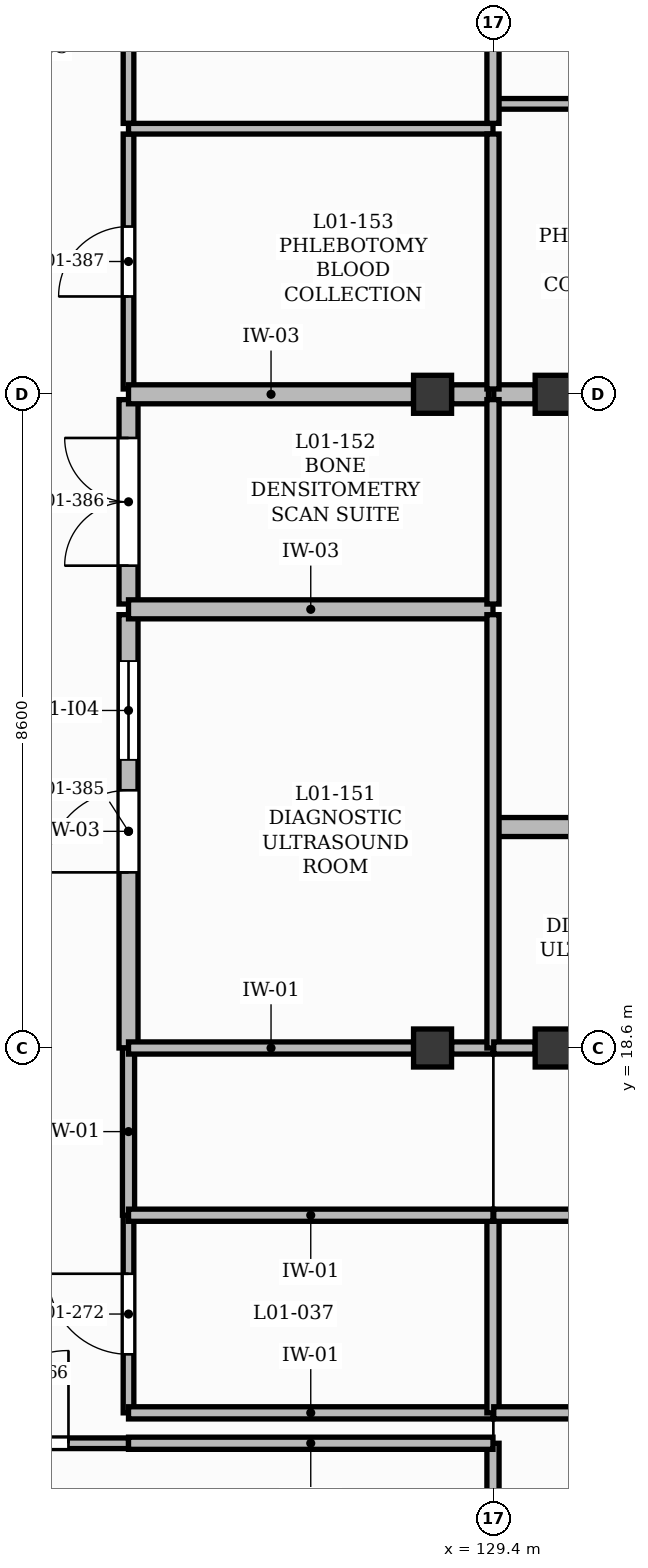
"""IFC4 building model, lengths in metres.
Left out: names, types, materials, properties, quantities, classifications, styles, units other than length and angle.
Written with IfcOpenShell. Run it as: python <this file> out.ifc"""

import sys

from ifc_helpers import new_model, si_unit, direction, frame, frame_2d, origin, origin_2d, place, context, subcontext, project, spatial, rectangle, extrude, element, fill, save


model = new_model("IFC4")
c1 = context("Model", 3, precision=1e-05, world=origin(), true_north=direction((0.0, 1.0)))
c2 = subcontext(c1, "Body", "Model", "MODEL_VIEW")
j1 = project(units=[si_unit("LENGTHUNIT", "METRE"), si_unit("PLANEANGLEUNIT", "RADIAN")], contexts=[c1])
p1 = place(None, origin())
s1 = spatial("IfcSite", under=j1, at=p1, CompositionType="ELEMENT")
p2 = place(p1, origin())
s2 = spatial("IfcBuilding", under=s1, at=p2, CompositionType="ELEMENT")
p3 = place(p2, frame((0.0, 0.0, 4.5)))
s3 = spatial("IfcBuildingStorey", under=s2, at=p3, CompositionType="ELEMENT", Elevation=4.5)
for number, where, z_axis, x_axis in (
    (1, (128.6, 18.6, 0.0), (0.0, 0.0, 1.0), (1.0, 0.0, 0.0)),
    (2, (128.6, 27.2, 0.0), (0.0, 0.0, 1.0), (1.0, 0.0, 0.0)),
    (3, (130.2, 18.6, 0.0), (0.0, 0.0, 1.0), (1.0, 0.0, 0.0)),
    (4, (130.2, 27.2, 0.0), (0.0, 0.0, 1.0), (1.0, 0.0, 0.0)),
):
    element("IfcColumn", number, at=place(p3, frame(where, z_axis=z_axis, x_axis=x_axis)), inside=s3, PredefinedType="COLUMN", context=c2, shape_type="SweptSolid", body=[
        extrude(rectangle(XDim=0.5, YDim=0.5, at=origin_2d()), origin(), (0.0, 0.0, 1.0), 4.22),
    ])
p4 = place(p3, frame((121.8, 13.4, 0.0), z_axis=(0.0, 0.0, 1.0), x_axis=(1.0, 0.0, 0.0)))
e5 = element("IfcWall", 5, at=p4, inside=s3, PredefinedType="PARTITIONING", context=c2, shape_type="SweptSolid", body=[
    extrude(rectangle(XDim=2.8, YDim=0.14, at=frame_2d((1.4, 0.0))), origin(), (0.0, 0.0, 1.0), 4.18),
])
p5 = place(p4, frame((0.79, 0.0, 0.0)))
e6 = element("IfcOpeningElement", 6, at=p5, cuts=e5, PredefinedType="OPENING", context=c2, shape_type="SweptSolid", body=[
    extrude(rectangle(XDim=1.22, YDim=2.1, at=frame_2d((0.61, 1.05))), frame((0.0, 0.08, 0.0), z_axis=(0.0, -1.0, 0.0), x_axis=(1.0, 0.0, 0.0)), (0.0, 0.0, 1.0), 0.16),
])
p6 = place(p3, frame((124.6, 13.8, 0.0), z_axis=(0.0, 0.0, 1.0), x_axis=(0.0, 1.0, 0.0)))
e7 = element("IfcWall", 7, at=p6, inside=s3, PredefinedType="PARTITIONING", context=c2, shape_type="SweptSolid", body=[
    extrude(rectangle(XDim=2.6, YDim=0.14, at=frame_2d((1.3, 0.0))), origin(), (0.0, 0.0, 1.0), 4.18),
])
p7 = place(p6, frame((0.77, 0.0, 0.0)))
e8 = element("IfcOpeningElement", 8, at=p7, cuts=e7, PredefinedType="OPENING", context=c2, shape_type="SweptSolid", body=[
    extrude(rectangle(XDim=1.06, YDim=2.15, at=frame_2d((0.53, 1.075))), frame((0.0, 0.08, 0.0), z_axis=(0.0, -1.0, 0.0), x_axis=(1.0, 0.0, 0.0)), (0.0, 0.0, 1.0), 0.16),
])
p8 = place(p3, frame((124.6, 18.6, 0.0), z_axis=(0.0, 0.0, 1.0), x_axis=(0.0, 1.0, 0.0)))
e9 = element("IfcWall", 9, at=p8, inside=s3, PredefinedType="SOLIDWALL", context=c2, shape_type="SweptSolid", body=[
    extrude(rectangle(XDim=5.701, YDim=0.25, at=frame_2d((2.851, 0.0))), origin(), (0.0, 0.0, 1.0), 4.18),
])
p9 = place(p8, frame((2.311, 0.0, 0.0)))
e10 = element("IfcOpeningElement", 10, at=p9, cuts=e9, PredefinedType="OPENING", context=c2, shape_type="SweptSolid", body=[
    extrude(rectangle(XDim=1.08, YDim=2.15, at=frame_2d((0.54, 1.075))), frame((0.0, 0.135, 0.0), z_axis=(0.0, -1.0, 0.0), x_axis=(1.0, 0.0, 0.0)), (0.0, 0.0, 1.0), 0.27),
])
p10 = place(p8, frame((3.791, 0.0, 1.1)))
e11 = element("IfcOpeningElement", 11, at=p10, cuts=e9, PredefinedType="OPENING", context=c2, shape_type="SweptSolid", body=[
    extrude(rectangle(XDim=1.3, YDim=1.0, at=frame_2d((0.65, 0.5))), frame((0.0, 0.135, 0.0), z_axis=(0.0, -1.0, 0.0), x_axis=(1.0, 0.0, 0.0)), (0.0, 0.0, 1.0), 0.27),
])
p11 = place(p3, frame((124.6, 24.441, 0.0), z_axis=(0.0, 0.0, 1.0), x_axis=(0.0, 1.0, 0.0)))
e12 = element("IfcWall", 12, at=p11, inside=s3, PredefinedType="SOLIDWALL", context=c2, shape_type="SweptSolid", body=[
    extrude(rectangle(XDim=2.689, YDim=0.25, at=frame_2d((1.344, 0.0))), origin(), (0.0, 0.0, 1.0), 4.18),
])
p12 = place(p11, frame((0.504, 0.0, 0.0)))
e13 = element("IfcOpeningElement", 13, at=p12, cuts=e12, PredefinedType="OPENING", context=c2, shape_type="SweptSolid", body=[
    extrude(rectangle(XDim=1.68, YDim=2.3, at=frame_2d((0.84, 1.15))), frame((0.0, 0.135, 0.0), z_axis=(0.0, -1.0, 0.0), x_axis=(1.0, 0.0, 0.0)), (0.0, 0.0, 1.0), 0.27),
])
p13 = place(p3, frame((124.6, 24.371, 0.0), z_axis=(0.0, 0.0, 1.0), x_axis=(1.0, 0.0, 0.0)))
e14 = element("IfcWall", 14, at=p13, inside=s3, PredefinedType="SOLIDWALL", context=c2, shape_type="SweptSolid", body=[
    extrude(rectangle(XDim=4.795, YDim=0.25, at=frame_2d((2.397, 0.0))), origin(), (0.0, 0.0, 1.0), 4.18),
])
p14 = place(p3, frame((124.6, 27.27, 0.0), z_axis=(0.0, 0.0, 1.0), x_axis=(0.0, 1.0, 0.0)))
e15 = element("IfcWall", 15, at=p14, inside=s3, PredefinedType="PARTITIONING", context=c2, shape_type="SweptSolid", body=[
    extrude(rectangle(XDim=3.354, YDim=0.14, at=frame_2d((1.677, 0.0))), origin(), (0.0, 0.0, 1.0), 4.18),
])
p15 = place(p14, frame((1.217, 0.0, 0.0)))
e16 = element("IfcOpeningElement", 16, at=p15, cuts=e15, PredefinedType="OPENING", context=c2, shape_type="SweptSolid", body=[
    extrude(rectangle(XDim=0.92, YDim=2.1, at=frame_2d((0.46, 1.05))), frame((0.0, 0.08, 0.0), z_axis=(0.0, -1.0, 0.0), x_axis=(1.0, 0.0, 0.0)), (0.0, 0.0, 1.0), 0.16),
])
p16 = place(p3, frame((124.6, 27.2, 0.0), z_axis=(0.0, 0.0, 1.0), x_axis=(1.0, 0.0, 0.0)))
e17 = element("IfcWall", 17, at=p16, inside=s3, PredefinedType="SOLIDWALL", context=c2, shape_type="SweptSolid", body=[
    extrude(rectangle(XDim=3.75, YDim=0.25, at=frame_2d((1.875, 0.0))), origin(), (0.0, 0.0, 1.0), 3.52),
])
p17 = place(p3, frame((128.85, 27.2, 0.0), z_axis=(0.0, 0.0, 1.0), x_axis=(1.0, 0.0, 0.0)))
e18 = element("IfcWall", 18, at=p17, inside=s3, PredefinedType="SOLIDWALL", context=c2, shape_type="SweptSolid", body=[
    extrude(rectangle(XDim=0.485, YDim=0.25, at=frame_2d((0.242, 0.0))), origin(), (0.0, 0.0, 1.0), 4.18),
])
p18 = place(p3, frame((124.6, 30.764, 0.0), z_axis=(0.0, 0.0, 1.0), x_axis=(0.0, 1.0, 0.0)))
e19 = element("IfcWall", 19, at=p18, inside=s3, PredefinedType="PARTITIONING", context=c2, shape_type="SweptSolid", body=[
    extrude(rectangle(XDim=5.966, YDim=0.14, at=frame_2d((2.983, 0.0))), origin(), (0.0, 0.0, 1.0), 4.18),
])
p19 = place(p18, frame((2.403, 0.0, 0.0)))
e20 = element("IfcOpeningElement", 20, at=p19, cuts=e19, PredefinedType="OPENING", context=c2, shape_type="SweptSolid", body=[
    extrude(rectangle(XDim=1.16, YDim=2.1, at=frame_2d((0.58, 1.05))), frame((0.0, 0.08, 0.0), z_axis=(0.0, -1.0, 0.0), x_axis=(1.0, 0.0, 0.0)), (0.0, 0.0, 1.0), 0.16),
])
p20 = place(p3, frame((124.6, 30.694, 0.0), z_axis=(0.0, 0.0, 1.0), x_axis=(1.0, 0.0, 0.0)))
e21 = element("IfcWall", 21, at=p20, inside=s3, PredefinedType="PARTITIONING", context=c2, shape_type="SweptSolid", body=[
    extrude(rectangle(XDim=4.795, YDim=0.14, at=frame_2d((2.397, 0.0))), origin(), (0.0, 0.0, 1.0), 4.18),
])
p21 = place(p3, frame((129.405, 21.507, 0.0), z_axis=(0.0, 0.0, 1.0), x_axis=(1.0, 0.0, 0.0)))
e22 = element("IfcWall", 22, at=p21, inside=s3, PredefinedType="SOLIDWALL", context=c2, shape_type="SweptSolid", body=[
    extrude(rectangle(XDim=4.395, YDim=0.25, at=frame_2d((2.198, 0.0))), origin(), (0.0, 0.0, 1.0), 4.18),
])
p22 = place(p3, frame((129.405, 27.2, 0.0), z_axis=(0.0, 0.0, 1.0), x_axis=(1.0, 0.0, 0.0)))
e23 = element("IfcWall", 23, at=p22, inside=s3, PredefinedType="SOLIDWALL", context=c2, shape_type="SweptSolid", body=[
    extrude(rectangle(XDim=0.545, YDim=0.25, at=frame_2d((0.272, 0.0))), origin(), (0.0, 0.0, 1.0), 4.18),
])
p23 = place(p3, frame((129.405, 31.021, 0.0), z_axis=(0.0, 0.0, 1.0), x_axis=(1.0, 0.0, 0.0)))
e24 = element("IfcWall", 24, at=p23, inside=s3, PredefinedType="PARTITIONING", context=c2, shape_type="SweptSolid", body=[
    extrude(rectangle(XDim=4.395, YDim=0.14, at=frame_2d((2.198, 0.0))), origin(), (0.0, 0.0, 1.0), 4.18),
])
p24 = place(p3, frame((129.395, 10.87, 0.0), z_axis=(0.0, 0.0, 1.0), x_axis=(0.0, 1.0, 0.0)))
e25 = element("IfcWall", 25, at=p24, inside=s3, PredefinedType="PARTITIONING", context=c2, shape_type="SweptSolid", body=[
    extrude(rectangle(XDim=2.53, YDim=0.16, at=frame_2d((1.265, 0.0))), origin(), (0.0, 0.0, 1.0), 4.18),
])
p25 = place(p3, frame((129.395, 13.4, 0.0), z_axis=(0.0, 0.0, 1.0), x_axis=(-1.0, 0.0, 0.0)))
e26 = element("IfcWall", 26, at=p25, inside=s3, PredefinedType="PARTITIONING", context=c2, shape_type="SweptSolid", body=[
    extrude(rectangle(XDim=4.795, YDim=0.16, at=frame_2d((2.397, 0.0))), origin(), (0.0, 0.0, 1.0), 4.18),
])
p26 = place(p3, frame((124.6, 16.4, 0.0), z_axis=(0.0, 0.0, 1.0), x_axis=(0.0, 1.0, 0.0)))
e27 = element("IfcWall", 27, at=p26, inside=s3, PredefinedType="PARTITIONING", context=c2, shape_type="SweptSolid", body=[
    extrude(rectangle(XDim=2.2, YDim=0.16, at=frame_2d((1.1, 0.0))), origin(), (0.0, 0.0, 1.0), 4.18),
])
p27 = place(p3, frame((124.6, 13.8, 0.0), z_axis=(0.0, 0.0, 1.0), x_axis=(1.0, 0.0, 0.0)))
e28 = element("IfcWall", 28, at=p27, inside=s3, PredefinedType="PARTITIONING", context=c2, shape_type="SweptSolid", body=[
    extrude(rectangle(XDim=4.795, YDim=0.16, at=frame_2d((2.397, 0.0))), origin(), (0.0, 0.0, 1.0), 4.18),
])
p28 = place(p3, frame((129.395, 13.8, 0.0), z_axis=(0.0, 0.0, 1.0), x_axis=(0.0, 1.0, 0.0)))
e29 = element("IfcWall", 29, at=p28, inside=s3, PredefinedType="PARTITIONING", context=c2, shape_type="SweptSolid", body=[
    extrude(rectangle(XDim=2.6, YDim=0.16, at=frame_2d((1.3, 0.0))), origin(), (0.0, 0.0, 1.0), 4.18),
])
p29 = place(p3, frame((129.395, 16.4, 0.0), z_axis=(0.0, 0.0, 1.0), x_axis=(-1.0, 0.0, 0.0)))
e30 = element("IfcWall", 30, at=p29, inside=s3, PredefinedType="PARTITIONING", context=c2, shape_type="SweptSolid", body=[
    extrude(rectangle(XDim=4.795, YDim=0.16, at=frame_2d((2.397, 0.0))), origin(), (0.0, 0.0, 1.0), 4.18),
])
for number, where, z_axis, x_axis in (
    (31, (129.405, 13.8, 0.0), (0.0, 0.0, 1.0), (1.0, 0.0, 0.0)),
    (32, (133.8, 16.4, 0.0), (0.0, 0.0, 1.0), (-1.0, 0.0, 0.0)),
):
    element("IfcWall", number, at=place(p3, frame(where, z_axis=z_axis, x_axis=x_axis)), inside=s3, PredefinedType="PARTITIONING", context=c2, shape_type="SweptSolid", body=[
        extrude(rectangle(XDim=4.395, YDim=0.16, at=frame_2d((2.198, 0.0))), origin(), (0.0, 0.0, 1.0), 4.18),
    ])
p30 = place(p3, frame((124.6, 18.6, 0.0), z_axis=(0.0, 0.0, 1.0), x_axis=(1.0, 0.0, 0.0)))
e33 = element("IfcWall", 33, at=p30, inside=s3, PredefinedType="PARTITIONING", context=c2, shape_type="SweptSolid", body=[
    extrude(rectangle(XDim=3.75, YDim=0.16, at=frame_2d((1.875, 0.0))), origin(), (0.0, 0.0, 1.0), 3.52),
])
p31 = place(p3, frame((128.85, 18.6, 0.0), z_axis=(0.0, 0.0, 1.0), x_axis=(1.0, 0.0, 0.0)))
e34 = element("IfcWall", 34, at=p31, inside=s3, PredefinedType="PARTITIONING", context=c2, shape_type="SweptSolid", body=[
    extrude(rectangle(XDim=0.545, YDim=0.16, at=frame_2d((0.272, 0.0))), origin(), (0.0, 0.0, 1.0), 4.18),
])
p32 = place(p3, frame((129.395, 18.6, 0.0), z_axis=(0.0, 0.0, 1.0), x_axis=(0.0, 1.0, 0.0)))
e35 = element("IfcWall", 35, at=p32, inside=s3, PredefinedType="PARTITIONING", context=c2, shape_type="SweptSolid", body=[
    extrude(rectangle(XDim=5.7, YDim=0.16, at=frame_2d((2.85, 0.0))), origin(), (0.0, 0.0, 1.0), 4.18),
])
p33 = place(p3, frame((129.395, 24.441, 0.0), z_axis=(0.0, 0.0, 1.0), x_axis=(0.0, 1.0, 0.0)))
e36 = element("IfcWall", 36, at=p33, inside=s3, PredefinedType="PARTITIONING", context=c2, shape_type="SweptSolid", body=[
    extrude(rectangle(XDim=2.689, YDim=0.16, at=frame_2d((1.345, 0.0))), origin(), (0.0, 0.0, 1.0), 4.18),
])
p34 = place(p3, frame((129.395, 27.27, 0.0), z_axis=(0.0, 0.0, 1.0), x_axis=(0.0, 1.0, 0.0)))
e37 = element("IfcWall", 37, at=p34, inside=s3, PredefinedType="PARTITIONING", context=c2, shape_type="SweptSolid", body=[
    extrude(rectangle(XDim=3.354, YDim=0.16, at=frame_2d((1.677, 0.0))), origin(), (0.0, 0.0, 1.0), 4.18),
])
p35 = place(p3, frame((129.395, 30.764, 0.0), z_axis=(0.0, 0.0, 1.0), x_axis=(0.0, 1.0, 0.0)))
e38 = element("IfcWall", 38, at=p35, inside=s3, PredefinedType="PARTITIONING", context=c2, shape_type="SweptSolid", body=[
    extrude(rectangle(XDim=5.966, YDim=0.16, at=frame_2d((2.983, 0.0))), origin(), (0.0, 0.0, 1.0), 4.18),
])
p36 = place(p3, frame((129.405, 18.6, 0.0), z_axis=(0.0, 0.0, 1.0), x_axis=(1.0, 0.0, 0.0)))
e39 = element("IfcWall", 39, at=p36, inside=s3, PredefinedType="PARTITIONING", context=c2, shape_type="SweptSolid", body=[
    extrude(rectangle(XDim=0.545, YDim=0.16, at=frame_2d((0.272, 0.0))), origin(), (0.0, 0.0, 1.0), 4.18),
])
p37 = place(p5, origin())
e40 = element("IfcDoor", 40, at=p37, inside=s3, OperationType="SINGLE_SWING_RIGHT", PredefinedType="DOOR", context=c2, shape_type="SweptSolid", body=[
    extrude(rectangle(XDim=1.22, YDim=2.1, at=frame_2d((0.61, 1.05))), frame((0.0, 0.025, 0.0), z_axis=(0.0, -1.0, 0.0), x_axis=(1.0, 0.0, 0.0)), (0.0, 0.0, 1.0), 0.05),
])
fill(e6, e40)
p38 = place(p7, origin())
e41 = element("IfcDoor", 41, at=p38, inside=s3, OperationType="SINGLE_SWING_RIGHT", PredefinedType="DOOR", context=c2, shape_type="SweptSolid", body=[
    extrude(rectangle(XDim=1.06, YDim=2.15, at=frame_2d((0.53, 1.075))), frame((0.0, 0.025, 0.0), z_axis=(0.0, -1.0, 0.0), x_axis=(1.0, 0.0, 0.0)), (0.0, 0.0, 1.0), 0.05),
])
fill(e8, e41)
p39 = place(p9, origin())
e42 = element("IfcDoor", 42, at=p39, inside=s3, OperationType="SINGLE_SWING_LEFT", PredefinedType="DOOR", context=c2, shape_type="SweptSolid", body=[
    extrude(rectangle(XDim=1.08, YDim=2.15, at=frame_2d((0.54, 1.075))), frame((0.0, 0.025, 0.0), z_axis=(0.0, -1.0, 0.0), x_axis=(1.0, 0.0, 0.0)), (0.0, 0.0, 1.0), 0.05),
])
fill(e10, e42)
p40 = place(p10, origin())
e43 = element("IfcWindow", 43, at=p40, inside=s3, PartitioningType="SINGLE_PANEL", PredefinedType="WINDOW", context=c2, shape_type="SweptSolid", body=[
    extrude(rectangle(XDim=1.3, YDim=1.0, at=frame_2d((0.65, 0.5))), frame((0.0, 0.03, 0.0), z_axis=(0.0, -1.0, 0.0), x_axis=(1.0, 0.0, 0.0)), (0.0, 0.0, 1.0), 0.06),
])
fill(e11, e43)
p41 = place(p12, origin())
e44 = element("IfcDoor", 44, at=p41, inside=s3, OperationType="DOUBLE_DOOR_SINGLE_SWING", PredefinedType="DOOR", context=c2, shape_type="SweptSolid", body=[
    extrude(rectangle(XDim=1.68, YDim=2.3, at=frame_2d((0.84, 1.15))), frame((0.0, 0.025, 0.0), z_axis=(0.0, -1.0, 0.0), x_axis=(1.0, 0.0, 0.0)), (0.0, 0.0, 1.0), 0.05),
])
fill(e13, e44)
p42 = place(p15, origin())
e45 = element("IfcDoor", 45, at=p42, inside=s3, OperationType="SINGLE_SWING_LEFT", PredefinedType="DOOR", context=c2, shape_type="SweptSolid", body=[
    extrude(rectangle(XDim=0.92, YDim=2.1, at=frame_2d((0.46, 1.05))), frame((0.0, 0.025, 0.0), z_axis=(0.0, -1.0, 0.0), x_axis=(1.0, 0.0, 0.0)), (0.0, 0.0, 1.0), 0.05),
])
fill(e16, e45)
save(model, sys.argv[1])
